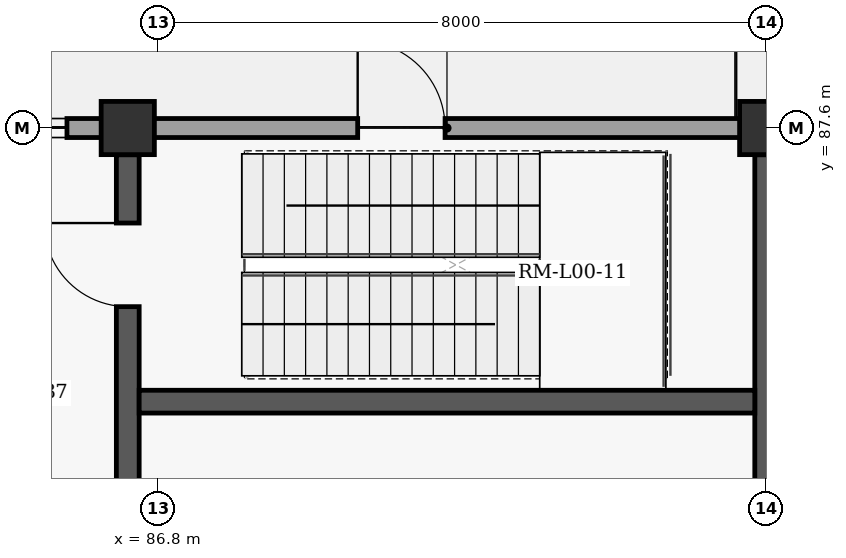
"""IFC4 building model, lengths in metres.
Left out: names, types, materials, properties, quantities, classifications, styles, units other than length and angle.
Written with IfcOpenShell. Run it as: python <this file> out.ifc"""

import sys

from ifc_helpers import new_model, si_unit, direction, frame, frame_2d, origin, origin_2d, place, context, subcontext, project, spatial, rectangle, extrude, element, fill, save


model = new_model("IFC4")
c1 = context("Model", 3, precision=1e-05, world=origin(), true_north=direction((0.0, 1.0)))
c2 = subcontext(c1, "Body", "Model", "MODEL_VIEW")
j1 = project(units=[si_unit("LENGTHUNIT", "METRE"), si_unit("PLANEANGLEUNIT", "RADIAN")], contexts=[c1])
p1 = place(None, origin())
s1 = spatial("IfcSite", under=j1, at=p1, CompositionType="ELEMENT")
p2 = place(p1, origin())
s2 = spatial("IfcBuilding", under=s1, at=p2, CompositionType="ELEMENT")
p3 = place(p2, origin())
s3 = spatial("IfcBuildingStorey", under=s2, at=p3, CompositionType="ELEMENT", Elevation=0.0)
for number, where, z_axis, x_axis in (
    (1, (86.4, 87.6, 0.0), (0.0, 0.0, 1.0), (1.0, 0.0, 0.0)),
    (2, (94.8, 87.6, 0.0), (0.0, 0.0, 1.0), (1.0, 0.0, 0.0)),
):
    element("IfcColumn", number, at=place(p3, frame(where, z_axis=z_axis, x_axis=x_axis)), inside=s3, PredefinedType="COLUMN", context=c2, shape_type="SweptSolid", body=[
        extrude(rectangle(XDim=0.7, YDim=0.7, at=origin_2d()), origin(), (0.0, 0.0, 1.0), 5.4),
    ])
p4 = place(p3, frame((54.8, 87.6, 0.0), z_axis=(0.0, 0.0, 1.0), x_axis=(1.0, 0.0, 0.0)))
e3 = element("IfcWall", 3, at=p4, inside=s3, PredefinedType="SOLIDWALL", context=c2, shape_type="SweptSolid", body=[
    extrude(rectangle(XDim=84.6, YDim=0.25, at=frame_2d((42.3, 0.0))), origin(), (0.0, 0.0, 1.0), 4.29),
])
p5 = place(p4, frame((34.625, 0.0, 0.0)))
e4 = element("IfcOpeningElement", 4, at=p5, cuts=e3, PredefinedType="OPENING", context=c2, shape_type="SweptSolid", body=[
    extrude(rectangle(XDim=1.15, YDim=2.2, at=frame_2d((0.575, 1.1))), frame((0.0, 0.135, 0.0), z_axis=(0.0, -1.0, 0.0), x_axis=(1.0, 0.0, 0.0)), (0.0, 0.0, 1.0), 0.27),
])
p6 = place(p4, frame((62.2, 0.0, 0.0)))
e5 = element("IfcOpeningElement", 5, at=p6, cuts=e3, PredefinedType="OPENING", context=c2, shape_type="SweptSolid", body=[
    extrude(rectangle(XDim=2.0, YDim=2.5, at=frame_2d((1.0, 1.25))), frame((0.0, 0.135, 0.0), z_axis=(0.0, -1.0, 0.0), x_axis=(1.0, 0.0, 0.0)), (0.0, 0.0, 1.0), 0.27),
])
p7 = place(p4, frame((2.2, 0.0, 0.9)))
e6 = element("IfcOpeningElement", 6, at=p7, cuts=e3, PredefinedType="OPENING", context=c2, shape_type="SweptSolid", body=[
    extrude(rectangle(XDim=2.0, YDim=1.7, at=frame_2d((1.0, 0.85))), frame((0.0, 0.135, 0.0), z_axis=(0.0, -1.0, 0.0), x_axis=(1.0, 0.0, 0.0)), (0.0, 0.0, 1.0), 0.27),
])
p8 = place(p4, frame((15.7, 0.0, 0.9)))
e7 = element("IfcOpeningElement", 7, at=p8, cuts=e3, PredefinedType="OPENING", context=c2, shape_type="SweptSolid", body=[
    extrude(rectangle(XDim=2.2, YDim=1.7, at=frame_2d((1.1, 0.85))), frame((0.0, 0.135, 0.0), z_axis=(0.0, -1.0, 0.0), x_axis=(1.0, 0.0, 0.0)), (0.0, 0.0, 1.0), 0.27),
])
p9 = place(p4, frame((29.2, 0.0, 0.9)))
e8 = element("IfcOpeningElement", 8, at=p9, cuts=e3, PredefinedType="OPENING", context=c2, shape_type="SweptSolid", body=[
    extrude(rectangle(XDim=1.6, YDim=1.65, at=frame_2d((0.8, 0.825))), frame((0.0, 0.135, 0.0), z_axis=(0.0, -1.0, 0.0), x_axis=(1.0, 0.0, 0.0)), (0.0, 0.0, 1.0), 0.27),
])
p10 = place(p4, frame((42.7, 0.0, 0.9)))
e9 = element("IfcOpeningElement", 9, at=p10, cuts=e3, PredefinedType="OPENING", context=c2, shape_type="SweptSolid", body=[
    extrude(rectangle(XDim=2.6, YDim=1.75, at=frame_2d((1.3, 0.875))), frame((0.0, 0.135, 0.0), z_axis=(0.0, -1.0, 0.0), x_axis=(1.0, 0.0, 0.0)), (0.0, 0.0, 1.0), 0.27),
])
p11 = place(p4, frame((56.95, 0.0, 0.9)))
e10 = element("IfcOpeningElement", 10, at=p11, cuts=e3, PredefinedType="OPENING", context=c2, shape_type="SweptSolid", body=[
    extrude(rectangle(XDim=2.8, YDim=1.8, at=frame_2d((1.4, 0.9))), frame((0.0, 0.135, 0.0), z_axis=(0.0, -1.0, 0.0), x_axis=(1.0, 0.0, 0.0)), (0.0, 0.0, 1.0), 0.27),
])
p12 = place(p4, frame((68.25, 0.0, 0.9)))
e11 = element("IfcOpeningElement", 11, at=p12, cuts=e3, PredefinedType="OPENING", context=c2, shape_type="SweptSolid", body=[
    extrude(rectangle(XDim=3.0, YDim=1.8, at=frame_2d((1.5, 0.9))), frame((0.0, 0.135, 0.0), z_axis=(0.0, -1.0, 0.0), x_axis=(1.0, 0.0, 0.0)), (0.0, 0.0, 1.0), 0.27),
])
p13 = place(p3, frame((86.4, 79.952, 0.0), z_axis=(0.0, 0.0, 1.0), x_axis=(0.0, 1.0, 0.0)))
e12 = element("IfcWall", 12, at=p13, inside=s3, PredefinedType="SHEAR", context=c2, shape_type="SweptSolid", body=[
    extrude(rectangle(XDim=7.296, YDim=0.3, at=frame_2d((3.648, 0.0))), origin(), (0.0, 0.0, 1.0), 5.14),
])
p14 = place(p13, frame((5.298, 0.0, 0.0)))
e13 = element("IfcOpeningElement", 13, at=p14, cuts=e12, PredefinedType="OPENING", context=c2, shape_type="SweptSolid", body=[
    extrude(rectangle(XDim=1.1, YDim=2.15, at=frame_2d((0.55, 1.075))), frame((0.0, 0.16, 0.0), z_axis=(0.0, -1.0, 0.0), x_axis=(1.0, 0.0, 0.0)), (0.0, 0.0, 1.0), 0.32),
])
p15 = place(p13, frame((1.273, 0.0, 0.0)))
e14 = element("IfcOpeningElement", 14, at=p15, cuts=e12, PredefinedType="OPENING", context=c2, shape_type="SweptSolid", body=[
    extrude(rectangle(XDim=1.15, YDim=2.2, at=frame_2d((0.575, 1.1))), frame((0.0, 0.16, 0.0), z_axis=(0.0, -1.0, 0.0), x_axis=(1.0, 0.0, 0.0)), (0.0, 0.0, 1.0), 0.32),
])
p16 = place(p3, frame((94.8, 79.952, 0.0), z_axis=(0.0, 0.0, 1.0), x_axis=(0.0, 1.0, 0.0)))
e15 = element("IfcWall", 15, at=p16, inside=s3, PredefinedType="SHEAR", context=c2, shape_type="SweptSolid", body=[
    extrude(rectangle(XDim=7.296, YDim=0.3, at=frame_2d((3.648, 0.0))), origin(), (0.0, 0.0, 1.0), 5.14),
])
p17 = place(p3, frame((86.55, 84.0, 0.0), z_axis=(0.0, 0.0, 1.0), x_axis=(1.0, 0.0, 0.0)))
e16 = element("IfcWall", 16, at=p17, inside=s3, PredefinedType="SHEAR", context=c2, shape_type="SweptSolid", body=[
    extrude(rectangle(XDim=8.1, YDim=0.3, at=frame_2d((4.05, 0.0))), origin(), (0.0, 0.0, 1.0), 5.14),
])
p18 = place(p5, origin())
e17 = element("IfcDoor", 17, at=p18, inside=s3, OperationType="SINGLE_SWING_LEFT", PredefinedType="DOOR", context=c2, shape_type="SweptSolid", body=[
    extrude(rectangle(XDim=1.15, YDim=2.2, at=frame_2d((0.575, 1.1))), frame((0.0, 0.025, 0.0), z_axis=(0.0, -1.0, 0.0), x_axis=(1.0, 0.0, 0.0)), (0.0, 0.0, 1.0), 0.05),
])
fill(e4, e17)
p19 = place(p9, origin())
e18 = element("IfcWindow", 18, at=p19, inside=s3, PartitioningType="SINGLE_PANEL", PredefinedType="WINDOW", context=c2, shape_type="SweptSolid", body=[
    extrude(rectangle(XDim=1.6, YDim=1.65, at=frame_2d((0.8, 0.825))), frame((0.0, 0.03, 0.0), z_axis=(0.0, -1.0, 0.0), x_axis=(1.0, 0.0, 0.0)), (0.0, 0.0, 1.0), 0.06),
])
fill(e8, e18)
p20 = place(p14, origin())
e19 = element("IfcDoor", 19, at=p20, inside=s3, OperationType="SINGLE_SWING_RIGHT", PredefinedType="DOOR", context=c2, shape_type="SweptSolid", body=[
    extrude(rectangle(XDim=1.1, YDim=2.15, at=frame_2d((0.55, 1.075))), frame((0.0, 0.025, 0.0), z_axis=(0.0, -1.0, 0.0), x_axis=(1.0, 0.0, 0.0)), (0.0, 0.0, 1.0), 0.05),
])
fill(e13, e19)
save(model, sys.argv[1])
